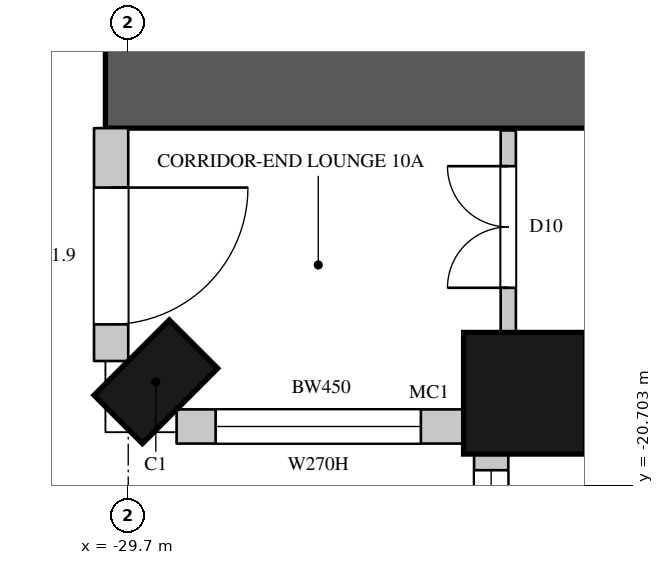
"""IFC4 building model, lengths in metres.
Left out: names, types, materials, properties, quantities, classifications, styles, units other than length and angle.
Written with IfcOpenShell. Run it as: python <this file> out.ifc"""

import sys

from ifc_helpers import new_model, si_unit, direction, frame, frame_2d, origin, origin_2d, place, context, subcontext, project, spatial, rectangle, circle, extrude, element, fill, save


model = new_model("IFC4")
c1 = context("Model", 3, precision=1e-05, world=origin(), true_north=direction((0.0, 1.0)))
c2 = subcontext(c1, "Body", "Model", "MODEL_VIEW")
j1 = project(units=[si_unit("LENGTHUNIT", "METRE"), si_unit("PLANEANGLEUNIT", "RADIAN")], contexts=[c1])
p1 = place(None, origin())
s1 = spatial("IfcSite", under=j1, at=p1, CompositionType="ELEMENT")
p2 = place(p1, origin())
s2 = spatial("IfcBuilding", under=s1, at=p2, CompositionType="ELEMENT")
p3 = place(p2, frame((0.0, 0.0, 66.3)))
s3 = spatial("IfcBuildingStorey", under=s2, at=p3, CompositionType="ELEMENT", Elevation=66.3)
p4 = place(p3, frame((-29.337, -19.337, 0.0), z_axis=(0.0, 0.0, 1.0), x_axis=(0.707106781187, -0.707106781187, 0.0)))
e1 = element("IfcColumn", 1, at=p4, inside=s3, PredefinedType="COLUMN", context=c2, shape_type="SweptSolid", body=[
    extrude(rectangle(XDim=0.9, YDim=1.4, at=origin_2d()), origin(), (0.0, 0.0, 1.0), 3.6),
])
p5 = place(p3, frame((-24.488, -19.488, 0.0), z_axis=(0.0, 0.0, 1.0), x_axis=(1.0, 0.0, 0.0)))
e2 = element("IfcColumn", 2, at=p5, inside=s3, PredefinedType="COLUMN", context=c2, shape_type="SweptSolid", body=[
    extrude(circle(Radius=0.8, at=origin_2d()), origin(), (0.0, 0.0, 1.0), 3.6),
])
p6 = place(p3, frame((-29.925, -16.0, 0.0), z_axis=(0.0, 0.0, 1.0), x_axis=(0.0, -1.0, 0.0)))
e3 = element("IfcWall", 3, at=p6, inside=s3, PredefinedType="SOLIDWALL", context=c2, shape_type="SweptSolid", body=[
    extrude(rectangle(XDim=3.064, YDim=0.45, at=frame_2d((1.532, 0.0))), origin(), (0.0, 0.0, 1.0), 3.3),
])
p7 = place(p6, frame((0.782, 0.0, 0.0)))
e4 = element("IfcOpeningElement", 4, at=p7, cuts=e3, PredefinedType="OPENING", context=c2, shape_type="SweptSolid", body=[
    extrude(rectangle(XDim=1.8, YDim=2.4, at=frame_2d((0.9, 1.2))), frame((0.0, 0.235, 0.0), z_axis=(0.0, -1.0, 0.0), x_axis=(1.0, 0.0, 0.0)), (0.0, 0.0, 1.0), 0.47),
])
p8 = place(p3, frame((-29.064, -19.925, 0.0), z_axis=(0.0, 0.0, 1.0), x_axis=(1.0, 0.0, 0.0)))
e5 = element("IfcWall", 5, at=p8, inside=s3, PredefinedType="SOLIDWALL", context=c2, shape_type="SweptSolid", body=[
    extrude(rectangle(XDim=3.805, YDim=0.45, at=frame_2d((1.903, 0.0))), origin(), (0.0, 0.0, 1.0), 3.3),
])
p9 = place(p8, frame((0.514, 0.0, 1.05)))
e6 = element("IfcOpeningElement", 6, at=p9, cuts=e5, PredefinedType="OPENING", context=c2, shape_type="SweptSolid", body=[
    extrude(rectangle(XDim=2.7, YDim=2.0, at=frame_2d((1.35, 1.0))), frame((0.0, 0.235, 0.0), z_axis=(0.0, -1.0, 0.0), x_axis=(1.0, 0.0, 0.0)), (0.0, 0.0, 1.0), 0.47),
])
p10 = place(p3, frame((-24.925, -20.259, 0.0), z_axis=(0.0, 0.0, 1.0), x_axis=(0.0, -1.0, 0.0)))
e7 = element("IfcWall", 7, at=p10, inside=s3, PredefinedType="SOLIDWALL", context=c2, shape_type="SweptSolid", body=[
    extrude(rectangle(XDim=1.792, YDim=0.45, at=frame_2d((0.896, 0.0))), origin(), (0.0, 0.0, 1.0), 3.3),
])
p11 = place(p10, frame((0.241, 0.0, 1.05)))
e8 = element("IfcOpeningElement", 8, at=p11, cuts=e7, PredefinedType="OPENING", context=c2, shape_type="SweptSolid", body=[
    extrude(rectangle(XDim=1.2, YDim=2.0, at=frame_2d((0.6, 1.0))), frame((0.0, 0.235, 0.0), z_axis=(0.0, -1.0, 0.0), x_axis=(1.0, 0.0, 0.0)), (0.0, 0.0, 1.0), 0.47),
])
p12 = place(p3, frame((-30.0, -15.4, 0.0), z_axis=(0.0, 0.0, 1.0), x_axis=(1.0, 0.0, 0.0)))
e9 = element("IfcWall", 9, at=p12, inside=s3, PredefinedType="SHEAR", context=c2, shape_type="SweptSolid", body=[
    extrude(rectangle(XDim=16.0, YDim=1.2, at=frame_2d((8.0, 0.0))), origin(), (0.0, 0.0, 1.0), 3.6),
])
p13 = place(p12, frame((13.4, 0.0, 0.0)))
e10 = element("IfcOpeningElement", 10, at=p13, cuts=e9, PredefinedType="OPENING", context=c2, shape_type="SweptSolid", body=[
    extrude(rectangle(XDim=1.5, YDim=2.4, at=frame_2d((0.75, 1.2))), frame((0.0, 0.61, 0.0), z_axis=(0.0, -1.0, 0.0), x_axis=(1.0, 0.0, 0.0)), (0.0, 0.0, 1.0), 1.22),
])
p14 = place(p3, frame((-24.7, -18.7, 0.0), z_axis=(0.0, 0.0, 1.0), x_axis=(0.0, 1.0, 0.0)))
e11 = element("IfcWall", 11, at=p14, inside=s3, PredefinedType="PARTITIONING", context=c2, shape_type="SweptSolid", body=[
    extrude(rectangle(XDim=2.67, YDim=0.2, at=frame_2d((1.335, 0.0))), origin(), (0.0, 0.0, 1.0), 3.3),
])
p15 = place(p14, frame((0.6, 0.0, 0.0)))
e12 = element("IfcOpeningElement", 12, at=p15, cuts=e11, PredefinedType="OPENING", context=c2, shape_type="SweptSolid", body=[
    extrude(rectangle(XDim=1.6, YDim=2.4, at=frame_2d((0.8, 1.2))), frame((0.0, 0.11, 0.0), z_axis=(0.0, -1.0, 0.0), x_axis=(1.0, 0.0, 0.0)), (0.0, 0.0, 1.0), 0.22),
])
p16 = place(p3, frame((-23.7, -19.7, 0.0), z_axis=(0.0, 0.0, 1.0), x_axis=(1.0, 0.0, 0.0)))
e13 = element("IfcWall", 13, at=p16, inside=s3, PredefinedType="PARTITIONING", context=c2, shape_type="SweptSolid", body=[
    extrude(rectangle(XDim=3.0, YDim=0.2, at=frame_2d((1.5, 0.0))), origin(), (0.0, 0.0, 1.0), 3.3),
])
p17 = place(p16, frame((0.8, 0.0, 0.0)))
e14 = element("IfcOpeningElement", 14, at=p17, cuts=e13, PredefinedType="OPENING", context=c2, shape_type="SweptSolid", body=[
    extrude(rectangle(XDim=0.9, YDim=2.2, at=frame_2d((0.45, 1.1))), frame((0.0, 0.11, 0.0), z_axis=(0.0, -1.0, 0.0), x_axis=(1.0, 0.0, 0.0)), (0.0, 0.0, 1.0), 0.22),
])
p18 = place(p7, origin())
e15 = element("IfcDoor", 15, at=p18, inside=s3, OperationType="SLIDING_TO_LEFT", PredefinedType="DOOR", context=c2, shape_type="SweptSolid", body=[
    extrude(rectangle(XDim=1.8, YDim=2.4, at=frame_2d((0.9, 1.2))), frame((0.0, 0.13, 0.0), z_axis=(0.0, -1.0, 0.0), x_axis=(1.0, 0.0, 0.0)), (0.0, 0.0, 1.0), 0.05),
])
fill(e4, e15)
p19 = place(p9, origin())
e16 = element("IfcWindow", 16, at=p19, inside=s3, PartitioningType="SINGLE_PANEL", PredefinedType="WINDOW", context=c2, shape_type="SweptSolid", body=[
    extrude(rectangle(XDim=2.7, YDim=2.0, at=frame_2d((1.35, 1.0))), frame((0.0, 0.135, 0.0), z_axis=(0.0, -1.0, 0.0), x_axis=(1.0, 0.0, 0.0)), (0.0, 0.0, 1.0), 0.06),
])
fill(e6, e16)
p20 = place(p11, origin())
e17 = element("IfcWindow", 17, at=p20, inside=s3, PartitioningType="SINGLE_PANEL", PredefinedType="WINDOW", context=c2, shape_type="SweptSolid", body=[
    extrude(rectangle(XDim=1.2, YDim=2.0, at=frame_2d((0.6, 1.0))), frame((0.0, 0.135, 0.0), z_axis=(0.0, -1.0, 0.0), x_axis=(1.0, 0.0, 0.0)), (0.0, 0.0, 1.0), 0.06),
])
fill(e8, e17)
p21 = place(p15, origin())
e18 = element("IfcDoor", 18, at=p21, inside=s3, OperationType="DOUBLE_DOOR_SINGLE_SWING", PredefinedType="DOOR", context=c2, shape_type="SweptSolid", body=[
    extrude(rectangle(XDim=1.6, YDim=2.4, at=frame_2d((0.8, 1.2))), frame((0.0, 0.025, 0.0), z_axis=(0.0, -1.0, 0.0), x_axis=(1.0, 0.0, 0.0)), (0.0, 0.0, 1.0), 0.05),
])
fill(e12, e18)
save(model, sys.argv[1])
